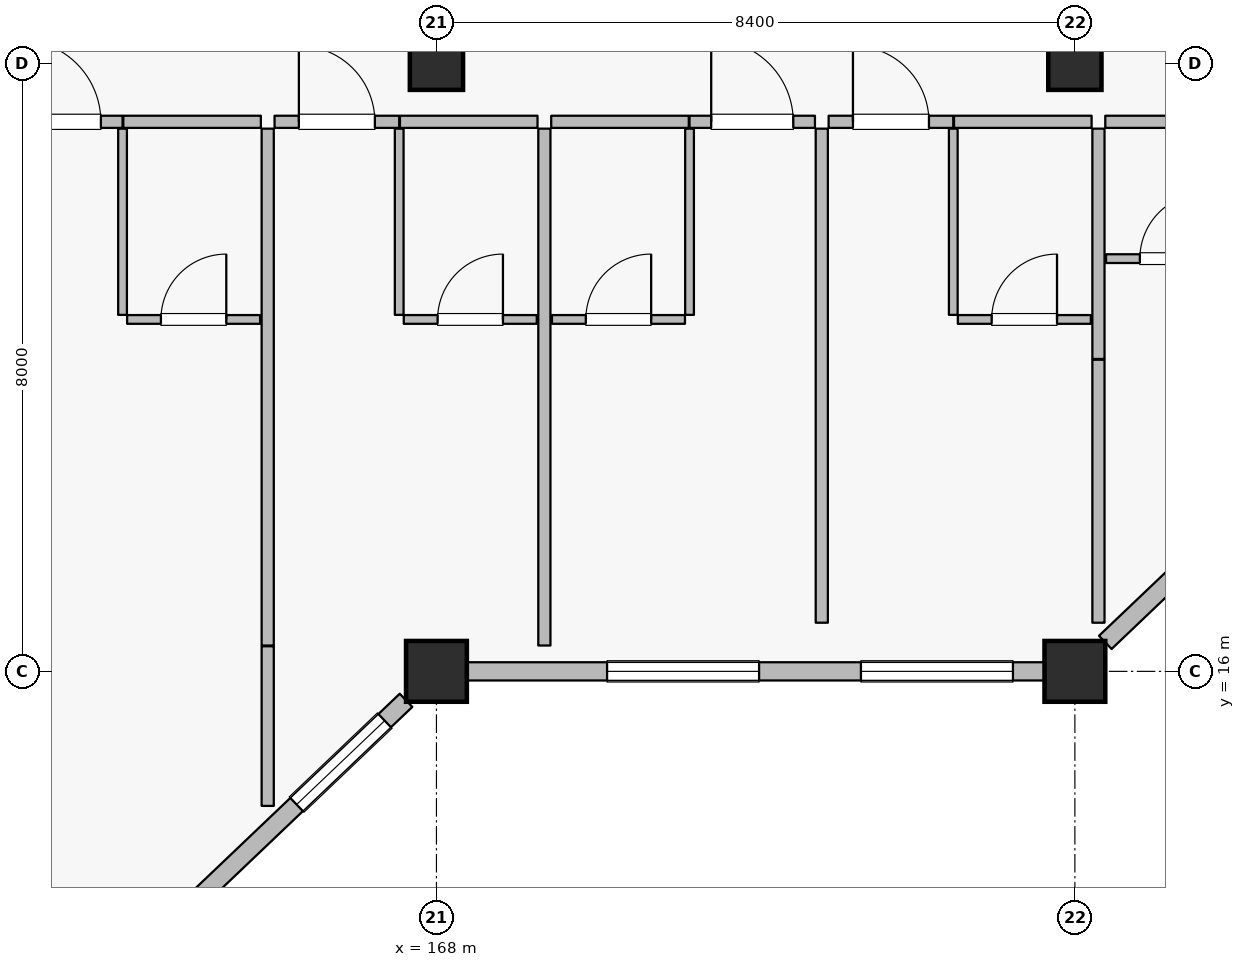
"""IFC4 building model, lengths in metres.
Left out: names, types, materials, properties, quantities, classifications, styles, units other than length and angle.
Written with IfcOpenShell. Run it as: python <this file> out.ifc"""

import sys

from ifc_helpers import new_model, si_unit, direction, frame, frame_2d, origin, origin_2d, place, context, subcontext, project, spatial, rectangle, extrude, element, fill, save


model = new_model("IFC4")
c1 = context("Model", 3, precision=1e-05, world=origin(), true_north=direction((0.0, 1.0)))
c2 = subcontext(c1, "Body", "Model", "MODEL_VIEW")
j1 = project(units=[si_unit("LENGTHUNIT", "METRE"), si_unit("PLANEANGLEUNIT", "RADIAN")], contexts=[c1])
p1 = place(None, origin())
s1 = spatial("IfcSite", under=j1, at=p1, CompositionType="ELEMENT")
p2 = place(p1, origin())
s2 = spatial("IfcBuilding", under=s1, at=p2, CompositionType="ELEMENT")
p3 = place(p2, frame((0.0, 0.0, 11.4)))
s3 = spatial("IfcBuildingStorey", under=s2, at=p3, CompositionType="ELEMENT", Elevation=11.4)
for number, where, z_axis, x_axis in (
    (1, (168.0, 16.0, 0.0), (0.0, 0.0, 1.0), (1.0, 0.0, 0.0)),
    (2, (176.4, 16.0, 0.0), (0.0, 0.0, 1.0), (1.0, 0.0, 0.0)),
):
    element("IfcColumn", number, at=place(p3, frame(where, z_axis=z_axis, x_axis=x_axis)), inside=s3, PredefinedType="COLUMN", context=c2, shape_type="SweptSolid", body=[
        extrude(rectangle(XDim=0.8, YDim=0.8, at=origin_2d()), origin(), (0.0, 0.0, 1.0), 4.8),
    ])
for number, where, z_axis, x_axis in (
    (3, (168.0, 24.0, 0.0), (0.0, 0.0, 1.0), (1.0, 0.0, 0.0)),
    (4, (176.4, 24.0, 0.0), (0.0, 0.0, 1.0), (1.0, 0.0, 0.0)),
):
    element("IfcColumn", number, at=place(p3, frame(where, z_axis=z_axis, x_axis=x_axis)), inside=s3, PredefinedType="COLUMN", context=c2, shape_type="SweptSolid", body=[
        extrude(rectangle(XDim=0.7, YDim=0.7, at=origin_2d()), origin(), (0.0, 0.0, 1.0), 4.8),
    ])
p4 = place(p3, frame((167.6, 15.619, 0.0), z_axis=(0.0, 0.0, 1.0), x_axis=(-0.724156739794, -0.689635422677, 0.0)))
e5 = element("IfcWall", 5, at=p4, inside=s3, PredefinedType="SOLIDWALL", context=c2, shape_type="SweptSolid", body=[
    extrude(rectangle(XDim=10.495, YDim=0.24, at=frame_2d((5.248, 0.0))), origin(), (0.0, 0.0, 1.0), 4.13),
])
p5 = place(p4, frame((0.388, 0.0, 0.8)))
e6 = element("IfcOpeningElement", 6, at=p5, cuts=e5, PredefinedType="OPENING", context=c2, shape_type="SweptSolid", body=[
    extrude(rectangle(XDim=1.6, YDim=1.6, at=frame_2d((0.8, 0.8))), frame((0.0, 0.13, 0.0), z_axis=(0.0, -1.0, 0.0), x_axis=(1.0, 0.0, 0.0)), (0.0, 0.0, 1.0), 0.26),
])
p6 = place(p4, frame((4.234, 0.0, 0.8)))
e7 = element("IfcOpeningElement", 7, at=p6, cuts=e5, PredefinedType="OPENING", context=c2, shape_type="SweptSolid", body=[
    extrude(rectangle(XDim=1.6, YDim=1.6, at=frame_2d((0.8, 0.8))), frame((0.0, 0.13, 0.0), z_axis=(0.0, -1.0, 0.0), x_axis=(1.0, 0.0, 0.0)), (0.0, 0.0, 1.0), 0.26),
])
p7 = place(p4, frame((8.294, 0.0, 0.8)))
e8 = element("IfcOpeningElement", 8, at=p7, cuts=e5, PredefinedType="OPENING", context=c2, shape_type="SweptSolid", body=[
    extrude(rectangle(XDim=1.6, YDim=1.6, at=frame_2d((0.8, 0.8))), frame((0.0, 0.13, 0.0), z_axis=(0.0, -1.0, 0.0), x_axis=(1.0, 0.0, 0.0)), (0.0, 0.0, 1.0), 0.26),
])
p8 = place(p3, frame((176.0, 16.0, 0.0), z_axis=(0.0, 0.0, 1.0), x_axis=(-1.0, 0.0, 0.0)))
e9 = element("IfcWall", 9, at=p8, inside=s3, PredefinedType="SOLIDWALL", context=c2, shape_type="SweptSolid", body=[
    extrude(rectangle(XDim=7.6, YDim=0.24, at=frame_2d((3.8, 0.0))), origin(), (0.0, 0.0, 1.0), 4.13),
])
p9 = place(p8, frame((0.415, 0.0, 0.8)))
e10 = element("IfcOpeningElement", 10, at=p9, cuts=e9, PredefinedType="OPENING", context=c2, shape_type="SweptSolid", body=[
    extrude(rectangle(XDim=2.0, YDim=1.75, at=frame_2d((1.0, 0.875))), frame((0.0, 0.13, 0.0), z_axis=(0.0, -1.0, 0.0), x_axis=(1.0, 0.0, 0.0)), (0.0, 0.0, 1.0), 0.26),
])
p10 = place(p8, frame((3.755, 0.0, 0.8)))
e11 = element("IfcOpeningElement", 11, at=p10, cuts=e9, PredefinedType="OPENING", context=c2, shape_type="SweptSolid", body=[
    extrude(rectangle(XDim=2.0, YDim=1.75, at=frame_2d((1.0, 0.875))), frame((0.0, 0.13, 0.0), z_axis=(0.0, -1.0, 0.0), x_axis=(1.0, 0.0, 0.0)), (0.0, 0.0, 1.0), 0.26),
])
p11 = place(p3, frame((184.4, 23.619, 0.0), z_axis=(0.0, 0.0, 1.0), x_axis=(-0.724145676014, -0.689647040094, 0.0)))
e12 = element("IfcWall", 12, at=p11, inside=s3, PredefinedType="SOLIDWALL", context=c2, shape_type="SweptSolid", body=[
    extrude(rectangle(XDim=10.495, YDim=0.24, at=frame_2d((5.248, 0.0))), origin(), (0.0, 0.0, 1.0), 4.13),
])
p12 = place(p11, frame((2.066, 0.0, 0.8)))
e13 = element("IfcOpeningElement", 13, at=p12, cuts=e12, PredefinedType="OPENING", context=c2, shape_type="SweptSolid", body=[
    extrude(rectangle(XDim=2.0, YDim=1.75, at=frame_2d((1.0, 0.875))), frame((0.0, 0.13, 0.0), z_axis=(0.0, -1.0, 0.0), x_axis=(1.0, 0.0, 0.0)), (0.0, 0.0, 1.0), 0.26),
])
p13 = place(p11, frame((7.099, 0.0, 0.8)))
e14 = element("IfcOpeningElement", 14, at=p13, cuts=e12, PredefinedType="OPENING", context=c2, shape_type="SweptSolid", body=[
    extrude(rectangle(XDim=2.0, YDim=1.75, at=frame_2d((1.0, 0.875))), frame((0.0, 0.13, 0.0), z_axis=(0.0, -1.0, 0.0), x_axis=(1.0, 0.0, 0.0)), (0.0, 0.0, 1.0), 0.26),
])
p14 = place(p3, frame((162.22, 23.23, 0.0), z_axis=(0.0, 0.0, 1.0), x_axis=(1.0, 0.0, 0.0)))
e15 = element("IfcWall", 15, at=p14, inside=s3, PredefinedType="PARTITIONING", context=c2, shape_type="SweptSolid", body=[
    extrude(rectangle(XDim=1.65, YDim=0.16, at=frame_2d((0.825, 0.0))), origin(), (0.0, 0.0, 1.0), 4.535),
])
p15 = place(p14, frame((0.285, 0.0, 0.0)))
e16 = element("IfcOpeningElement", 16, at=p15, cuts=e15, PredefinedType="OPENING", context=c2, shape_type="SweptSolid", body=[
    extrude(rectangle(XDim=1.08, YDim=2.3, at=frame_2d((0.54, 1.15))), frame((0.0, 0.09, 0.0), z_axis=(0.0, -1.0, 0.0), x_axis=(1.0, 0.0, 0.0)), (0.0, 0.0, 1.0), 0.18),
])
p16 = place(p3, frame((163.88, 23.23, 0.0), z_axis=(0.0, 0.0, 1.0), x_axis=(1.0, 0.0, 0.0)))
e17 = element("IfcWall", 17, at=p16, inside=s3, PredefinedType="PARTITIONING", context=c2, shape_type="SweptSolid", body=[
    extrude(rectangle(XDim=1.81, YDim=0.16, at=frame_2d((0.905, 0.0))), origin(), (0.0, 0.0, 1.0), 4.535),
])
p17 = place(p3, frame((163.87, 20.69, 0.0), z_axis=(0.0, 0.0, 1.0), x_axis=(0.0, 1.0, 0.0)))
e18 = element("IfcWall", 18, at=p17, inside=s3, PredefinedType="PARTITIONING", context=c2, shape_type="SweptSolid", body=[
    extrude(rectangle(XDim=2.45, YDim=0.115, at=frame_2d((1.225, 0.0))), origin(), (0.0, 0.0, 1.0), 4.535),
])
p18 = place(p3, frame((163.93, 20.63, 0.0), z_axis=(0.0, 0.0, 1.0), x_axis=(1.0, 0.0, 0.0)))
e19 = element("IfcWall", 19, at=p18, inside=s3, PredefinedType="PARTITIONING", context=c2, shape_type="SweptSolid", body=[
    extrude(rectangle(XDim=1.75, YDim=0.115, at=frame_2d((0.875, 0.0))), origin(), (0.0, 0.0, 1.0), 4.535),
])
p19 = place(p18, frame((0.445, 0.0, 0.0)))
e20 = element("IfcOpeningElement", 20, at=p19, cuts=e19, PredefinedType="OPENING", context=c2, shape_type="SweptSolid", body=[
    extrude(rectangle(XDim=0.86, YDim=2.12, at=frame_2d((0.43, 1.06))), frame((0.0, 0.067, 0.0), z_axis=(0.0, -1.0, 0.0), x_axis=(1.0, 0.0, 0.0)), (0.0, 0.0, 1.0), 0.135),
])
p20 = place(p3, frame((165.78, 14.23, 0.0), z_axis=(0.0, 0.0, 1.0), x_axis=(0.0, 1.0, 0.0)))
e21 = element("IfcWall", 21, at=p20, inside=s3, PredefinedType="PARTITIONING", context=c2, shape_type="SweptSolid", body=[
    extrude(rectangle(XDim=2.1, YDim=0.16, at=frame_2d((1.05, 0.0))), origin(), (0.0, 0.0, 1.0), 4.535),
])
p21 = place(p3, frame((165.87, 23.23, 0.0), z_axis=(0.0, 0.0, 1.0), x_axis=(1.0, 0.0, 0.0)))
e22 = element("IfcWall", 22, at=p21, inside=s3, PredefinedType="PARTITIONING", context=c2, shape_type="SweptSolid", body=[
    extrude(rectangle(XDim=1.64, YDim=0.16, at=frame_2d((0.82, 0.0))), origin(), (0.0, 0.0, 1.0), 4.535),
])
p22 = place(p21, frame((0.32, 0.0, 0.0)))
e23 = element("IfcOpeningElement", 23, at=p22, cuts=e22, PredefinedType="OPENING", context=c2, shape_type="SweptSolid", body=[
    extrude(rectangle(XDim=1.0, YDim=2.25, at=frame_2d((0.5, 1.125))), frame((0.0, 0.09, 0.0), z_axis=(0.0, -1.0, 0.0), x_axis=(1.0, 0.0, 0.0)), (0.0, 0.0, 1.0), 0.18),
])
p23 = place(p3, frame((167.52, 23.23, 0.0), z_axis=(0.0, 0.0, 1.0), x_axis=(1.0, 0.0, 0.0)))
e24 = element("IfcWall", 24, at=p23, inside=s3, PredefinedType="PARTITIONING", context=c2, shape_type="SweptSolid", body=[
    extrude(rectangle(XDim=1.81, YDim=0.16, at=frame_2d((0.905, 0.0))), origin(), (0.0, 0.0, 1.0), 4.535),
])
p24 = place(p3, frame((167.51, 20.69, 0.0), z_axis=(0.0, 0.0, 1.0), x_axis=(0.0, 1.0, 0.0)))
e25 = element("IfcWall", 25, at=p24, inside=s3, PredefinedType="PARTITIONING", context=c2, shape_type="SweptSolid", body=[
    extrude(rectangle(XDim=2.45, YDim=0.115, at=frame_2d((1.225, 0.0))), origin(), (0.0, 0.0, 1.0), 4.535),
])
p25 = place(p3, frame((167.57, 20.63, 0.0), z_axis=(0.0, 0.0, 1.0), x_axis=(1.0, 0.0, 0.0)))
e26 = element("IfcWall", 26, at=p25, inside=s3, PredefinedType="PARTITIONING", context=c2, shape_type="SweptSolid", body=[
    extrude(rectangle(XDim=1.75, YDim=0.115, at=frame_2d((0.875, 0.0))), origin(), (0.0, 0.0, 1.0), 4.535),
])
p26 = place(p25, frame((0.445, 0.0, 0.0)))
e27 = element("IfcOpeningElement", 27, at=p26, cuts=e26, PredefinedType="OPENING", context=c2, shape_type="SweptSolid", body=[
    extrude(rectangle(XDim=0.86, YDim=2.12, at=frame_2d((0.43, 1.06))), frame((0.0, 0.067, 0.0), z_axis=(0.0, -1.0, 0.0), x_axis=(1.0, 0.0, 0.0)), (0.0, 0.0, 1.0), 0.135),
])
p27 = place(p3, frame((165.78, 16.34, 0.0), z_axis=(0.0, 0.0, 1.0), x_axis=(0.0, 1.0, 0.0)))
e28 = element("IfcWall", 28, at=p27, inside=s3, PredefinedType="PARTITIONING", context=c2, shape_type="SweptSolid", body=[
    extrude(rectangle(XDim=6.8, YDim=0.16, at=frame_2d((3.4, 0.0))), origin(), (0.0, 0.0, 1.0), 4.535),
])
p28 = place(p3, frame((169.51, 23.23, 0.0), z_axis=(0.0, 0.0, 1.0), x_axis=(1.0, 0.0, 0.0)))
e29 = element("IfcWall", 29, at=p28, inside=s3, PredefinedType="PARTITIONING", context=c2, shape_type="SweptSolid", body=[
    extrude(rectangle(XDim=1.81, YDim=0.16, at=frame_2d((0.905, 0.0))), origin(), (0.0, 0.0, 1.0), 4.535),
])
p29 = place(p3, frame((171.33, 23.23, 0.0), z_axis=(0.0, 0.0, 1.0), x_axis=(1.0, 0.0, 0.0)))
e30 = element("IfcWall", 30, at=p29, inside=s3, PredefinedType="PARTITIONING", context=c2, shape_type="SweptSolid", body=[
    extrude(rectangle(XDim=1.65, YDim=0.16, at=frame_2d((0.825, 0.0))), origin(), (0.0, 0.0, 1.0), 4.535),
])
p30 = place(p29, frame((0.285, 0.0, 0.0)))
e31 = element("IfcOpeningElement", 31, at=p30, cuts=e30, PredefinedType="OPENING", context=c2, shape_type="SweptSolid", body=[
    extrude(rectangle(XDim=1.08, YDim=2.3, at=frame_2d((0.54, 1.15))), frame((0.0, 0.09, 0.0), z_axis=(0.0, -1.0, 0.0), x_axis=(1.0, 0.0, 0.0)), (0.0, 0.0, 1.0), 0.18),
])
p31 = place(p3, frame((171.33, 20.69, 0.0), z_axis=(0.0, 0.0, 1.0), x_axis=(0.0, 1.0, 0.0)))
e32 = element("IfcWall", 32, at=p31, inside=s3, PredefinedType="PARTITIONING", context=c2, shape_type="SweptSolid", body=[
    extrude(rectangle(XDim=2.45, YDim=0.115, at=frame_2d((1.225, 0.0))), origin(), (0.0, 0.0, 1.0), 4.535),
])
p32 = place(p3, frame((169.52, 20.63, 0.0), z_axis=(0.0, 0.0, 1.0), x_axis=(1.0, 0.0, 0.0)))
e33 = element("IfcWall", 33, at=p32, inside=s3, PredefinedType="PARTITIONING", context=c2, shape_type="SweptSolid", body=[
    extrude(rectangle(XDim=1.75, YDim=0.115, at=frame_2d((0.875, 0.0))), origin(), (0.0, 0.0, 1.0), 4.535),
])
p33 = place(p32, frame((0.445, 0.0, 0.0)))
e34 = element("IfcOpeningElement", 34, at=p33, cuts=e33, PredefinedType="OPENING", context=c2, shape_type="SweptSolid", body=[
    extrude(rectangle(XDim=0.86, YDim=2.12, at=frame_2d((0.43, 1.06))), frame((0.0, 0.067, 0.0), z_axis=(0.0, -1.0, 0.0), x_axis=(1.0, 0.0, 0.0)), (0.0, 0.0, 1.0), 0.135),
])
p34 = place(p3, frame((169.42, 16.34, 0.0), z_axis=(0.0, 0.0, 1.0), x_axis=(0.0, 1.0, 0.0)))
e35 = element("IfcWall", 35, at=p34, inside=s3, PredefinedType="PARTITIONING", context=c2, shape_type="SweptSolid", body=[
    extrude(rectangle(XDim=6.8, YDim=0.16, at=frame_2d((3.4, 0.0))), origin(), (0.0, 0.0, 1.0), 4.535),
])
p35 = place(p3, frame((173.16, 23.23, 0.0), z_axis=(0.0, 0.0, 1.0), x_axis=(1.0, 0.0, 0.0)))
e36 = element("IfcWall", 36, at=p35, inside=s3, PredefinedType="PARTITIONING", context=c2, shape_type="SweptSolid", body=[
    extrude(rectangle(XDim=1.64, YDim=0.16, at=frame_2d((0.82, 0.0))), origin(), (0.0, 0.0, 1.0), 4.535),
])
p36 = place(p35, frame((0.32, 0.0, 0.0)))
e37 = element("IfcOpeningElement", 37, at=p36, cuts=e36, PredefinedType="OPENING", context=c2, shape_type="SweptSolid", body=[
    extrude(rectangle(XDim=1.0, YDim=2.25, at=frame_2d((0.5, 1.125))), frame((0.0, 0.09, 0.0), z_axis=(0.0, -1.0, 0.0), x_axis=(1.0, 0.0, 0.0)), (0.0, 0.0, 1.0), 0.18),
])
p37 = place(p3, frame((174.81, 23.23, 0.0), z_axis=(0.0, 0.0, 1.0), x_axis=(1.0, 0.0, 0.0)))
e38 = element("IfcWall", 38, at=p37, inside=s3, PredefinedType="PARTITIONING", context=c2, shape_type="SweptSolid", body=[
    extrude(rectangle(XDim=1.81, YDim=0.16, at=frame_2d((0.905, 0.0))), origin(), (0.0, 0.0, 1.0), 4.535),
])
p38 = place(p3, frame((174.8, 20.69, 0.0), z_axis=(0.0, 0.0, 1.0), x_axis=(0.0, 1.0, 0.0)))
e39 = element("IfcWall", 39, at=p38, inside=s3, PredefinedType="PARTITIONING", context=c2, shape_type="SweptSolid", body=[
    extrude(rectangle(XDim=2.45, YDim=0.115, at=frame_2d((1.225, 0.0))), origin(), (0.0, 0.0, 1.0), 4.535),
])
p39 = place(p3, frame((174.86, 20.63, 0.0), z_axis=(0.0, 0.0, 1.0), x_axis=(1.0, 0.0, 0.0)))
e40 = element("IfcWall", 40, at=p39, inside=s3, PredefinedType="PARTITIONING", context=c2, shape_type="SweptSolid", body=[
    extrude(rectangle(XDim=1.75, YDim=0.115, at=frame_2d((0.875, 0.0))), origin(), (0.0, 0.0, 1.0), 4.535),
])
p40 = place(p39, frame((0.445, 0.0, 0.0)))
e41 = element("IfcOpeningElement", 41, at=p40, cuts=e40, PredefinedType="OPENING", context=c2, shape_type="SweptSolid", body=[
    extrude(rectangle(XDim=0.86, YDim=2.12, at=frame_2d((0.43, 1.06))), frame((0.0, 0.067, 0.0), z_axis=(0.0, -1.0, 0.0), x_axis=(1.0, 0.0, 0.0)), (0.0, 0.0, 1.0), 0.135),
])
p41 = place(p3, frame((173.07, 16.64, 0.0), z_axis=(0.0, 0.0, 1.0), x_axis=(0.0, 1.0, 0.0)))
e42 = element("IfcWall", 42, at=p41, inside=s3, PredefinedType="PARTITIONING", context=c2, shape_type="SweptSolid", body=[
    extrude(rectangle(XDim=6.5, YDim=0.16, at=frame_2d((3.25, 0.0))), origin(), (0.0, 0.0, 1.0), 4.535),
])
p42 = place(p3, frame((176.71, 16.64, 0.0), z_axis=(0.0, 0.0, 1.0), x_axis=(0.0, 1.0, 0.0)))
e43 = element("IfcWall", 43, at=p42, inside=s3, PredefinedType="PARTITIONING", context=c2, shape_type="SweptSolid", body=[
    extrude(rectangle(XDim=3.46, YDim=0.16, at=frame_2d((1.73, 0.0))), origin(), (0.0, 0.0, 1.0), 4.535),
])
p43 = place(p3, frame((176.8, 23.23, 0.0), z_axis=(0.0, 0.0, 1.0), x_axis=(1.0, 0.0, 0.0)))
e44 = element("IfcWall", 44, at=p43, inside=s3, PredefinedType="PARTITIONING", context=c2, shape_type="SweptSolid", body=[
    extrude(rectangle(XDim=1.81, YDim=0.16, at=frame_2d((0.905, 0.0))), origin(), (0.0, 0.0, 1.0), 4.535),
])
p44 = place(p3, frame((176.81, 21.43, 0.0), z_axis=(0.0, 0.0, 1.0), x_axis=(1.0, 0.0, 0.0)))
e45 = element("IfcWall", 45, at=p44, inside=s3, PredefinedType="PARTITIONING", context=c2, shape_type="SweptSolid", body=[
    extrude(rectangle(XDim=1.75, YDim=0.115, at=frame_2d((0.875, 0.0))), origin(), (0.0, 0.0, 1.0), 4.535),
])
p45 = place(p44, frame((0.445, 0.0, 0.0)))
e46 = element("IfcOpeningElement", 46, at=p45, cuts=e45, PredefinedType="OPENING", context=c2, shape_type="SweptSolid", body=[
    extrude(rectangle(XDim=0.86, YDim=2.12, at=frame_2d((0.43, 1.06))), frame((0.0, 0.067, 0.0), z_axis=(0.0, -1.0, 0.0), x_axis=(1.0, 0.0, 0.0)), (0.0, 0.0, 1.0), 0.135),
])
p46 = place(p3, frame((176.71, 20.11, 0.0), z_axis=(0.0, 0.0, 1.0), x_axis=(0.0, 1.0, 0.0)))
e47 = element("IfcWall", 47, at=p46, inside=s3, PredefinedType="PARTITIONING", context=c2, shape_type="SweptSolid", body=[
    extrude(rectangle(XDim=3.03, YDim=0.16, at=frame_2d((1.515, 0.0))), origin(), (0.0, 0.0, 1.0), 4.535),
])
p47 = place(p5, origin())
e48 = element("IfcWindow", 48, at=p47, inside=s3, PartitioningType="SINGLE_PANEL", PredefinedType="WINDOW", context=c2, shape_type="SweptSolid", body=[
    extrude(rectangle(XDim=1.6, YDim=1.6, at=frame_2d((0.8, 0.8))), frame((0.0, 0.03, 0.0), z_axis=(0.0, -1.0, 0.0), x_axis=(1.0, 0.0, 0.0)), (0.0, 0.0, 1.0), 0.06),
])
fill(e6, e48)
p48 = place(p9, origin())
e49 = element("IfcWindow", 49, at=p48, inside=s3, PartitioningType="DOUBLE_PANEL_VERTICAL", PredefinedType="WINDOW", context=c2, shape_type="SweptSolid", body=[
    extrude(rectangle(XDim=2.0, YDim=1.75, at=frame_2d((1.0, 0.875))), frame((0.0, 0.03, 0.0), z_axis=(0.0, -1.0, 0.0), x_axis=(1.0, 0.0, 0.0)), (0.0, 0.0, 1.0), 0.06),
])
fill(e10, e49)
p49 = place(p10, origin())
e50 = element("IfcWindow", 50, at=p49, inside=s3, PartitioningType="DOUBLE_PANEL_VERTICAL", PredefinedType="WINDOW", context=c2, shape_type="SweptSolid", body=[
    extrude(rectangle(XDim=2.0, YDim=1.75, at=frame_2d((1.0, 0.875))), frame((0.0, 0.03, 0.0), z_axis=(0.0, -1.0, 0.0), x_axis=(1.0, 0.0, 0.0)), (0.0, 0.0, 1.0), 0.06),
])
fill(e11, e50)
p50 = place(p15, origin())
e51 = element("IfcDoor", 51, at=p50, inside=s3, OperationType="SINGLE_SWING_LEFT", PredefinedType="DOOR", context=c2, shape_type="SweptSolid", body=[
    extrude(rectangle(XDim=1.08, YDim=2.3, at=frame_2d((0.54, 1.15))), frame((0.0, 0.025, 0.0), z_axis=(0.0, -1.0, 0.0), x_axis=(1.0, 0.0, 0.0)), (0.0, 0.0, 1.0), 0.05),
])
fill(e16, e51)
p51 = place(p19, origin())
e52 = element("IfcDoor", 52, at=p51, inside=s3, OperationType="SINGLE_SWING_RIGHT", PredefinedType="DOOR", context=c2, shape_type="SweptSolid", body=[
    extrude(rectangle(XDim=0.86, YDim=2.12, at=frame_2d((0.43, 1.06))), frame((0.0, 0.025, 0.0), z_axis=(0.0, -1.0, 0.0), x_axis=(1.0, 0.0, 0.0)), (0.0, 0.0, 1.0), 0.05),
])
fill(e20, e52)
p52 = place(p22, origin())
e53 = element("IfcDoor", 53, at=p52, inside=s3, OperationType="SINGLE_SWING_LEFT", PredefinedType="DOOR", context=c2, shape_type="SweptSolid", body=[
    extrude(rectangle(XDim=1.0, YDim=2.25, at=frame_2d((0.5, 1.125))), frame((0.0, 0.025, 0.0), z_axis=(0.0, -1.0, 0.0), x_axis=(1.0, 0.0, 0.0)), (0.0, 0.0, 1.0), 0.05),
])
fill(e23, e53)
p53 = place(p26, origin())
e54 = element("IfcDoor", 54, at=p53, inside=s3, OperationType="SINGLE_SWING_RIGHT", PredefinedType="DOOR", context=c2, shape_type="SweptSolid", body=[
    extrude(rectangle(XDim=0.86, YDim=2.12, at=frame_2d((0.43, 1.06))), frame((0.0, 0.025, 0.0), z_axis=(0.0, -1.0, 0.0), x_axis=(1.0, 0.0, 0.0)), (0.0, 0.0, 1.0), 0.05),
])
fill(e27, e54)
p54 = place(p30, origin())
e55 = element("IfcDoor", 55, at=p54, inside=s3, OperationType="SINGLE_SWING_LEFT", PredefinedType="DOOR", context=c2, shape_type="SweptSolid", body=[
    extrude(rectangle(XDim=1.08, YDim=2.3, at=frame_2d((0.54, 1.15))), frame((0.0, 0.025, 0.0), z_axis=(0.0, -1.0, 0.0), x_axis=(1.0, 0.0, 0.0)), (0.0, 0.0, 1.0), 0.05),
])
fill(e31, e55)
p55 = place(p33, origin())
e56 = element("IfcDoor", 56, at=p55, inside=s3, OperationType="SINGLE_SWING_RIGHT", PredefinedType="DOOR", context=c2, shape_type="SweptSolid", body=[
    extrude(rectangle(XDim=0.86, YDim=2.12, at=frame_2d((0.43, 1.06))), frame((0.0, 0.025, 0.0), z_axis=(0.0, -1.0, 0.0), x_axis=(1.0, 0.0, 0.0)), (0.0, 0.0, 1.0), 0.05),
])
fill(e34, e56)
p56 = place(p36, origin())
e57 = element("IfcDoor", 57, at=p56, inside=s3, OperationType="SINGLE_SWING_LEFT", PredefinedType="DOOR", context=c2, shape_type="SweptSolid", body=[
    extrude(rectangle(XDim=1.0, YDim=2.25, at=frame_2d((0.5, 1.125))), frame((0.0, 0.025, 0.0), z_axis=(0.0, -1.0, 0.0), x_axis=(1.0, 0.0, 0.0)), (0.0, 0.0, 1.0), 0.05),
])
fill(e37, e57)
p57 = place(p40, origin())
e58 = element("IfcDoor", 58, at=p57, inside=s3, OperationType="SINGLE_SWING_RIGHT", PredefinedType="DOOR", context=c2, shape_type="SweptSolid", body=[
    extrude(rectangle(XDim=0.86, YDim=2.12, at=frame_2d((0.43, 1.06))), frame((0.0, 0.025, 0.0), z_axis=(0.0, -1.0, 0.0), x_axis=(1.0, 0.0, 0.0)), (0.0, 0.0, 1.0), 0.05),
])
fill(e41, e58)
p58 = place(p45, origin())
e59 = element("IfcDoor", 59, at=p58, inside=s3, OperationType="SINGLE_SWING_RIGHT", PredefinedType="DOOR", context=c2, shape_type="SweptSolid", body=[
    extrude(rectangle(XDim=0.86, YDim=2.12, at=frame_2d((0.43, 1.06))), frame((0.0, 0.025, 0.0), z_axis=(0.0, -1.0, 0.0), x_axis=(1.0, 0.0, 0.0)), (0.0, 0.0, 1.0), 0.05),
])
fill(e46, e59)
save(model, sys.argv[1])
